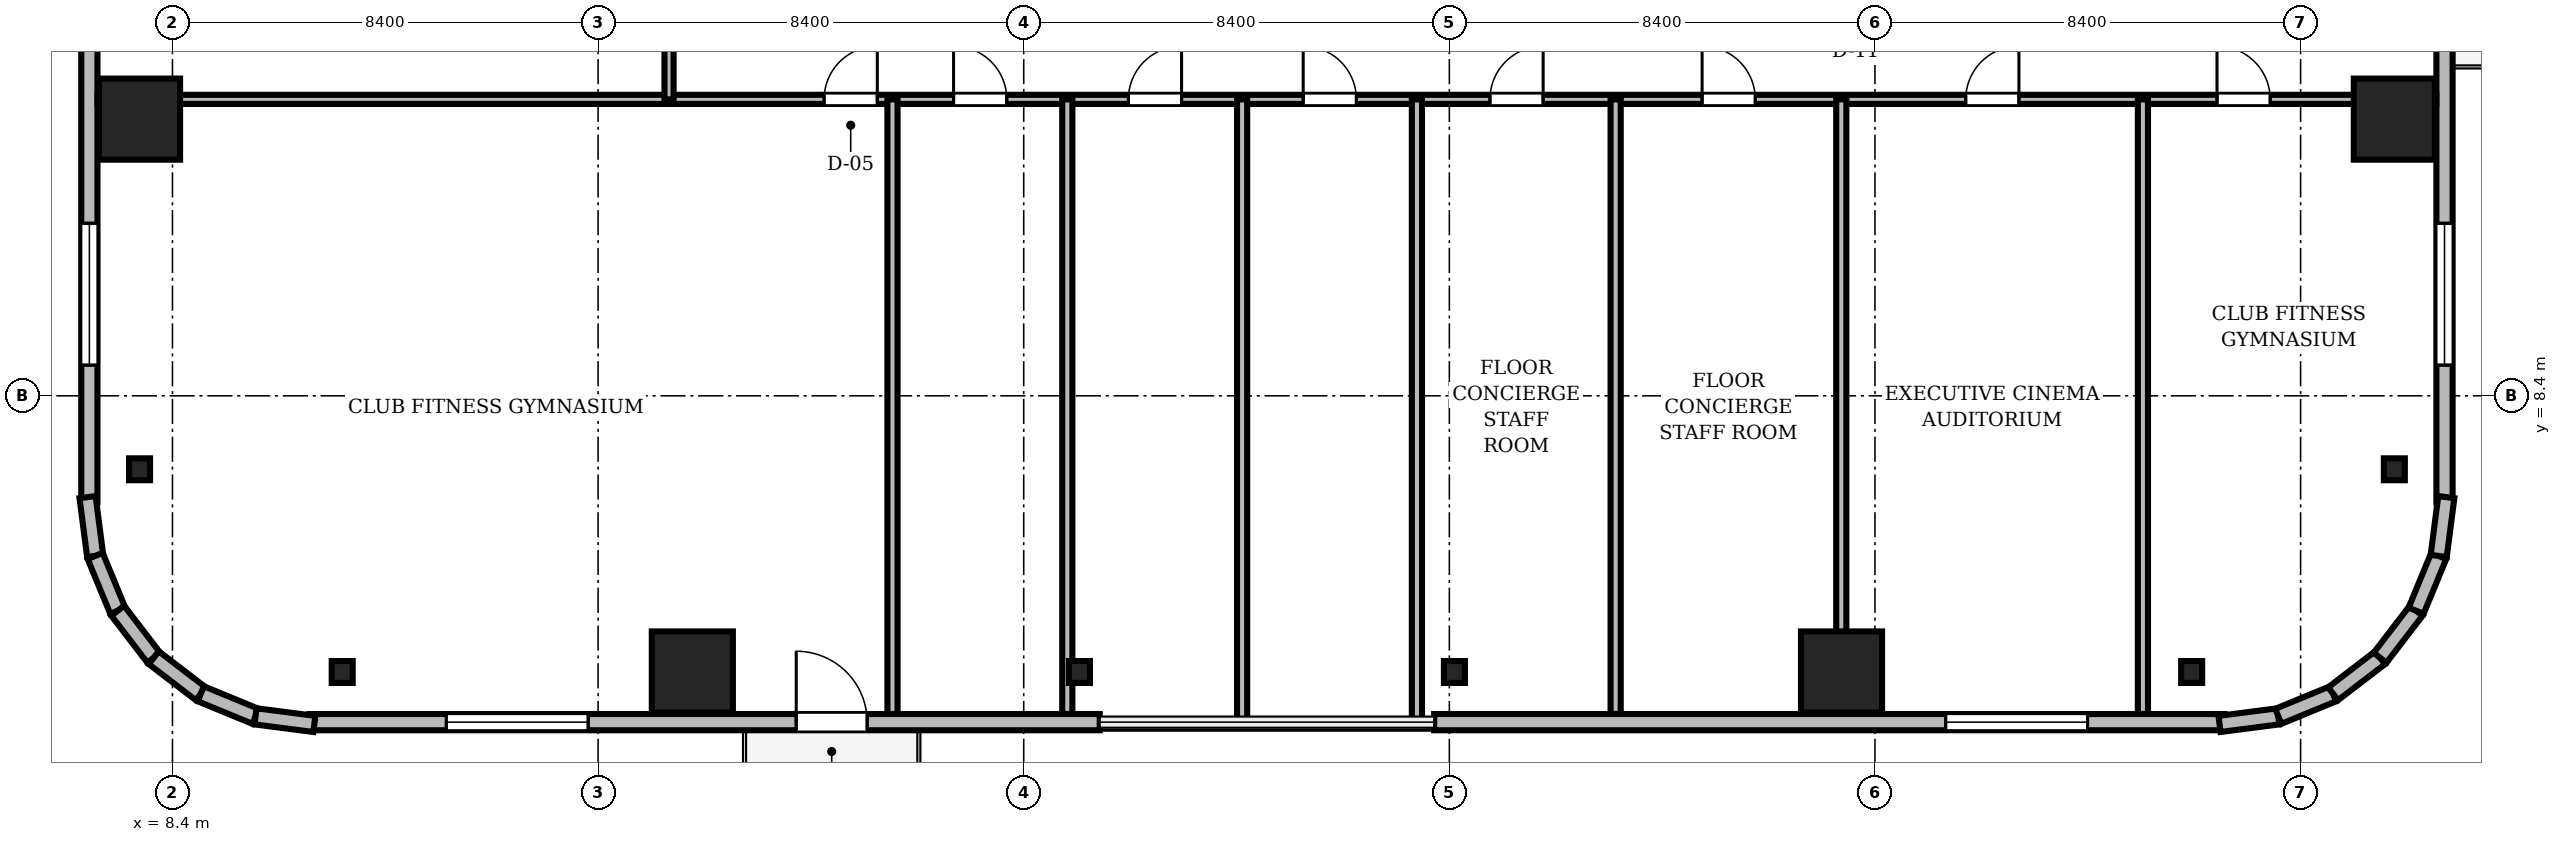
"""IFC4 building model, lengths in metres.
Left out: names, types, materials, properties, quantities, classifications, styles, units other than length and angle.
Written with IfcOpenShell. Run it as: python <this file> out.ifc"""

import sys

from ifc_helpers import new_model, si_unit, direction, frame, frame_2d, origin, origin_2d, place, context, subcontext, project, spatial, rectangle, i_section, extrude, source, transform, mapped, element, fill, save


model = new_model("IFC4")
c1 = context("Model", 3, precision=1e-05, world=origin(), true_north=direction((0.0, 1.0)))
c2 = subcontext(c1, "Body", "Model", "MODEL_VIEW")
j1 = project(units=[si_unit("LENGTHUNIT", "METRE"), si_unit("PLANEANGLEUNIT", "RADIAN")], contexts=[c1])
p1 = place(None, origin())
s1 = spatial("IfcSite", under=j1, at=p1, CompositionType="ELEMENT")
p2 = place(p1, origin())
s2 = spatial("IfcBuilding", under=s1, at=p2, CompositionType="ELEMENT")
p3 = place(p2, frame((0.0, 0.0, 133.5)))
s3 = spatial("IfcBuildingStorey", under=s2, at=p3, CompositionType="ELEMENT", Elevation=133.5)
m1 = source(origin(), c2, "Body", "SweptSolid", [
    extrude(rectangle(XDim=1.6, YDim=1.6, at=origin_2d()), origin(), (0.0, 0.0, 1.0), 3.46),
])
for number, where, z_axis, x_axis in (
    (1, (18.66, 2.95, 0.0), (0.0, 0.0, 1.0), (1.0, 0.0, 0.0)),
    (2, (41.34, 2.95, 0.0), (0.0, 0.0, 1.0), (1.0, 0.0, 0.0)),
    (3, (52.25, 13.86, 0.0), (0.0, 0.0, 1.0), (1.0, 0.0, 0.0)),
    (4, (7.75, 13.86, 0.0), (0.0, 0.0, 1.0), (1.0, 0.0, 0.0)),
):
    element("IfcColumn", number, at=place(p3, frame(where, z_axis=z_axis, x_axis=x_axis)), inside=s3, PredefinedType="COLUMN", context=c2, shape_type="MappedRepresentation", body=[
        mapped(m1, transform((0.0, 0.0, 0.0), scale=1.0)),
    ])
m2 = source(origin(), c2, "Body", "SweptSolid", [
    extrude(i_section(OverallWidth=0.414, OverallDepth=0.432, WebThickness=0.026, FlangeThickness=0.04, FilletRadius=0.015, at=origin_2d()), origin(), (0.0, 0.0, 1.0), 3.46),
])
for number, where, z_axis, x_axis in (
    (5, (11.75, 2.95, 0.0), (0.0, 0.0, 1.0), (1.0, 0.0, 0.0)),
    (6, (26.3, 2.95, 0.0), (0.0, 0.0, 1.0), (1.0, 0.0, 0.0)),
    (7, (33.7, 2.95, 0.0), (0.0, 0.0, 1.0), (1.0, 0.0, 0.0)),
    (8, (48.25, 2.95, 0.0), (0.0, 0.0, 1.0), (1.0, 0.0, 0.0)),
    (9, (52.25, 6.95, 0.0), (0.0, 0.0, 1.0), (1.0, 0.0, 0.0)),
    (10, (7.75, 6.95, 0.0), (0.0, 0.0, 1.0), (1.0, 0.0, 0.0)),
):
    element("IfcColumn", number, at=place(p3, frame(where, z_axis=z_axis, x_axis=x_axis)), inside=s3, PredefinedType="COLUMN", context=c2, shape_type="MappedRepresentation", body=[
        mapped(m2, transform((0.0, 0.0, 0.0), scale=1.0)),
    ])
m3 = source(origin(), c2, "Body", "SweptSolid", [
    extrude(rectangle(XDim=15.6, YDim=0.32, at=frame_2d((7.8, 0.0))), origin(), (0.0, 0.0, 1.0), 3.46),
])
p4 = place(p3, frame((11.1, 1.96, 0.0), z_axis=(0.0, 0.0, 1.0), x_axis=(1.0, 0.0, 0.0)))
e11 = element("IfcWall", 11, at=p4, inside=s3, PredefinedType="SOLIDWALL", context=c2, shape_type="MappedRepresentation", body=[
    mapped(m3, transform((0.0, 0.0, 0.0), scale=1.0)),
])
m4 = source(origin(), c2, "Body", "SweptSolid", [
    extrude(rectangle(XDim=1.4, YDim=2.3, at=frame_2d((0.7, 1.15))), frame((0.0, 0.17, 0.0), z_axis=(0.0, -1.0, 0.0), x_axis=(1.0, 0.0, 0.0)), (0.0, 0.0, 1.0), 0.34),
])
p5 = place(p4, frame((9.61, 0.0, 0.0)))
e12 = element("IfcOpeningElement", 12, at=p5, cuts=e11, PredefinedType="OPENING", context=c2, shape_type="MappedRepresentation", body=[
    mapped(m4, transform((0.0, 0.0, 0.0), scale=1.0)),
])
m5 = source(origin(), c2, "Body", "SweptSolid", [
    extrude(rectangle(XDim=2.8, YDim=2.4, at=frame_2d((1.4, 1.2))), frame((0.0, 0.17, 0.0), z_axis=(0.0, -1.0, 0.0), x_axis=(1.0, 0.0, 0.0)), (0.0, 0.0, 1.0), 0.34),
])
p6 = place(p4, frame((2.705, 0.0, 0.72)))
e13 = element("IfcOpeningElement", 13, at=p6, cuts=e11, PredefinedType="OPENING", context=c2, shape_type="MappedRepresentation", body=[
    mapped(m5, transform((0.0, 0.0, 0.0), scale=1.0)),
])
p7 = place(p3, frame((33.3, 1.96, 0.0), z_axis=(0.0, 0.0, 1.0), x_axis=(1.0, 0.0, 0.0)))
e14 = element("IfcWall", 14, at=p7, inside=s3, PredefinedType="SOLIDWALL", context=c2, shape_type="MappedRepresentation", body=[
    mapped(m3, transform((0.0, 0.0, 0.0), scale=1.0)),
])
p8 = place(p7, frame((10.095, 0.0, 0.72)))
e15 = element("IfcOpeningElement", 15, at=p8, cuts=e14, PredefinedType="OPENING", context=c2, shape_type="MappedRepresentation", body=[
    mapped(m5, transform((0.0, 0.0, 0.0), scale=1.0)),
])
p9 = place(p3, frame((6.76, 21.9, 0.0), z_axis=(0.0, 0.0, 1.0), x_axis=(0.0, -1.0, 0.0)))
e16 = element("IfcWall", 16, at=p9, inside=s3, PredefinedType="SOLIDWALL", context=c2, shape_type="MappedRepresentation", body=[
    mapped(m3, transform((0.0, 0.0, 0.0), scale=1.0)),
])
p10 = place(p9, frame((10.095, 0.0, 0.72)))
e17 = element("IfcOpeningElement", 17, at=p10, cuts=e16, PredefinedType="OPENING", context=c2, shape_type="MappedRepresentation", body=[
    mapped(m5, transform((0.0, 0.0, 0.0), scale=1.0)),
])
p11 = place(p3, frame((53.24, 6.3, 0.0), z_axis=(0.0, 0.0, 1.0), x_axis=(0.0, 1.0, 0.0)))
e18 = element("IfcWall", 18, at=p11, inside=s3, PredefinedType="SOLIDWALL", context=c2, shape_type="MappedRepresentation", body=[
    mapped(m3, transform((0.0, 0.0, 0.0), scale=1.0)),
])
p12 = place(p11, frame((9.61, 0.0, 0.0)))
e19 = element("IfcOpeningElement", 19, at=p12, cuts=e18, PredefinedType="OPENING", context=c2, shape_type="MappedRepresentation", body=[
    mapped(m4, transform((0.0, 0.0, 0.0), scale=1.0)),
])
p13 = place(p11, frame((2.705, 0.0, 0.72)))
e20 = element("IfcOpeningElement", 20, at=p13, cuts=e18, PredefinedType="OPENING", context=c2, shape_type="MappedRepresentation", body=[
    mapped(m5, transform((0.0, 0.0, 0.0), scale=1.0)),
])
m6 = source(origin(), c2, "Body", "SweptSolid", [
    extrude(rectangle(XDim=1.171, YDim=0.32, at=frame_2d((0.585, 0.0))), origin(), (0.0, 0.0, 1.0), 3.46),
])
p14 = place(p3, frame((6.724, 6.401, 0.0), z_axis=(0.0, 0.0, 1.0), x_axis=(0.128269133229, -0.991739395941, 0.0)))
e21 = element("IfcWall", 21, at=p14, inside=s3, PredefinedType="SOLIDWALL", context=c2, shape_type="MappedRepresentation", body=[
    mapped(m6, transform((0.0, 0.0, 0.0), scale=1.0)),
])
m7 = source(origin(), c2, "Body", "SweptSolid", [
    extrude(rectangle(XDim=1.169, YDim=0.32, at=frame_2d((0.584, 0.0))), origin(), (0.0, 0.0, 1.0), 3.46),
])
for number, where, z_axis, x_axis in (
    (22, (6.875, 5.24, 0.0), (0.0, 0.0, 1.0), (0.381, -0.925, 0.0)),
    (23, (7.32, 4.159, 0.0), (0.0, 0.0, 1.0), (0.608, -0.794, 0.0)),
):
    element("IfcWall", number, at=place(p3, frame(where, z_axis=z_axis, x_axis=x_axis)), inside=s3, PredefinedType="SOLIDWALL", context=c2, shape_type="MappedRepresentation", body=[
        mapped(m7, transform((0.0, 0.0, 0.0), scale=1.0)),
    ])
m8 = source(origin(), c2, "Body", "SweptSolid", [
    extrude(rectangle(XDim=1.169, YDim=0.32, at=frame_2d((0.584, 0.0))), origin(), (0.0, 0.0, 1.0), 3.46),
])
p15 = place(p3, frame((8.031, 3.231, 0.0), z_axis=(0.0, 0.0, 1.0), x_axis=(0.793663520347, -0.608356981114, 0.0)))
e24 = element("IfcWall", 24, at=p15, inside=s3, PredefinedType="SOLIDWALL", context=c2, shape_type="MappedRepresentation", body=[
    mapped(m8, transform((0.0, 0.0, 0.0), scale=1.0)),
])
m9 = source(origin(), c2, "Body", "SweptSolid", [
    extrude(rectangle(XDim=1.169, YDim=0.32, at=frame_2d((0.585, 0.0))), origin(), (0.0, 0.0, 1.0), 3.46),
])
p16 = place(p3, frame((8.959, 2.52, 0.0), z_axis=(0.0, 0.0, 1.0), x_axis=(0.924479075121, -0.381232789334, 0.0)))
e25 = element("IfcWall", 25, at=p16, inside=s3, PredefinedType="SOLIDWALL", context=c2, shape_type="MappedRepresentation", body=[
    mapped(m9, transform((0.0, 0.0, 0.0), scale=1.0)),
])
m10 = source(origin(), c2, "Body", "SweptSolid", [
    extrude(rectangle(XDim=1.17, YDim=0.32, at=frame_2d((0.585, 0.0))), origin(), (0.0, 0.0, 1.0), 3.46),
])
for number, where, z_axis, x_axis in (
    (26, (10.04, 2.074, 0.0), (0.0, 0.0, 1.0), (0.992, -0.128, 0.0)),
    (27, (48.8, 1.925, 0.0), (0.0, 0.0, 1.0), (0.992, 0.128, 0.0)),
):
    element("IfcWall", number, at=place(p3, frame(where, z_axis=z_axis, x_axis=x_axis)), inside=s3, PredefinedType="SOLIDWALL", context=c2, shape_type="MappedRepresentation", body=[
        mapped(m10, transform((0.0, 0.0, 0.0), scale=1.0)),
    ])
p17 = place(p3, frame((49.96, 2.074, 0.0), z_axis=(0.0, 0.0, 1.0), x_axis=(0.924479075121, 0.381232789334, 0.0)))
e28 = element("IfcWall", 28, at=p17, inside=s3, PredefinedType="SOLIDWALL", context=c2, shape_type="MappedRepresentation", body=[
    mapped(m9, transform((0.0, 0.0, 0.0), scale=1.0)),
])
p18 = place(p3, frame((51.041, 2.52, 0.0), z_axis=(0.0, 0.0, 1.0), x_axis=(0.793663520347, 0.608356981114, 0.0)))
e29 = element("IfcWall", 29, at=p18, inside=s3, PredefinedType="SOLIDWALL", context=c2, shape_type="MappedRepresentation", body=[
    mapped(m8, transform((0.0, 0.0, 0.0), scale=1.0)),
])
for number, where, z_axis, x_axis in (
    (30, (51.969, 3.231, 0.0), (0.0, 0.0, 1.0), (0.608, 0.794, 0.0)),
    (31, (52.68, 4.159, 0.0), (0.0, 0.0, 1.0), (0.381, 0.925, 0.0)),
):
    element("IfcWall", number, at=place(p3, frame(where, z_axis=z_axis, x_axis=x_axis)), inside=s3, PredefinedType="SOLIDWALL", context=c2, shape_type="MappedRepresentation", body=[
        mapped(m7, transform((0.0, 0.0, 0.0), scale=1.0)),
    ])
p19 = place(p3, frame((53.125, 5.24, 0.0), z_axis=(0.0, 0.0, 1.0), x_axis=(0.128269133229, 0.991739395941, 0.0)))
e32 = element("IfcWall", 32, at=p19, inside=s3, PredefinedType="SOLIDWALL", context=c2, shape_type="MappedRepresentation", body=[
    mapped(m6, transform((0.0, 0.0, 0.0), scale=1.0)),
])
m11 = source(origin(), c2, "Body", "SweptSolid", [
    extrude(rectangle(XDim=46.156, YDim=0.18, at=frame_2d((23.078, 0.0))), origin(), (0.0, 0.0, 1.0), 2.702),
])
p20 = place(p3, frame((6.922, 14.25, 0.0), z_axis=(0.0, 0.0, 1.0), x_axis=(1.0, 0.0, 0.0)))
e33 = element("IfcWall", 33, at=p20, inside=s3, PredefinedType="PARTITIONING", context=c2, shape_type="MappedRepresentation", body=[
    mapped(m11, transform((0.0, 0.0, 0.0), scale=1.0)),
])
m12 = source(origin(), c2, "Body", "SweptSolid", [
    extrude(rectangle(XDim=1.05, YDim=2.2, at=frame_2d((0.525, 1.1))), frame((0.0, 0.1, 0.0), z_axis=(0.0, -1.0, 0.0), x_axis=(1.0, 0.0, 0.0)), (0.0, 0.0, 1.0), 0.2),
])
p21 = place(p20, frame((14.338, 0.0, 0.0)))
e34 = element("IfcOpeningElement", 34, at=p21, cuts=e33, PredefinedType="OPENING", context=c2, shape_type="MappedRepresentation", body=[
    mapped(m12, transform((0.0, 0.0, 0.0), scale=1.0)),
])
p22 = place(p20, frame((16.893, 0.0, 0.0)))
e35 = element("IfcOpeningElement", 35, at=p22, cuts=e33, PredefinedType="OPENING", context=c2, shape_type="MappedRepresentation", body=[
    mapped(m12, transform((0.0, 0.0, 0.0), scale=1.0)),
])
p23 = place(p20, frame((20.344, 0.0, 0.0)))
e36 = element("IfcOpeningElement", 36, at=p23, cuts=e33, PredefinedType="OPENING", context=c2, shape_type="MappedRepresentation", body=[
    mapped(m12, transform((0.0, 0.0, 0.0), scale=1.0)),
])
p24 = place(p20, frame((23.793, 0.0, 0.0)))
e37 = element("IfcOpeningElement", 37, at=p24, cuts=e33, PredefinedType="OPENING", context=c2, shape_type="MappedRepresentation", body=[
    mapped(m12, transform((0.0, 0.0, 0.0), scale=1.0)),
])
p25 = place(p20, frame((27.479, 0.0, 0.0)))
e38 = element("IfcOpeningElement", 38, at=p25, cuts=e33, PredefinedType="OPENING", context=c2, shape_type="MappedRepresentation", body=[
    mapped(m12, transform((0.0, 0.0, 0.0), scale=1.0)),
])
p26 = place(p20, frame((31.666, 0.0, 0.0)))
e39 = element("IfcOpeningElement", 39, at=p26, cuts=e33, PredefinedType="OPENING", context=c2, shape_type="MappedRepresentation", body=[
    mapped(m12, transform((0.0, 0.0, 0.0), scale=1.0)),
])
p27 = place(p20, frame((36.869, 0.0, 0.0)))
e40 = element("IfcOpeningElement", 40, at=p27, cuts=e33, PredefinedType="OPENING", context=c2, shape_type="MappedRepresentation", body=[
    mapped(m12, transform((0.0, 0.0, 0.0), scale=1.0)),
])
p28 = place(p20, frame((41.828, 0.0, 0.0)))
e41 = element("IfcOpeningElement", 41, at=p28, cuts=e33, PredefinedType="OPENING", context=c2, shape_type="MappedRepresentation", body=[
    mapped(m12, transform((0.0, 0.0, 0.0), scale=1.0)),
])
m13 = source(origin(), c2, "Body", "SweptSolid", [
    extrude(rectangle(XDim=14.3, YDim=0.18, at=frame_2d((7.15, 0.0))), origin(), (0.0, 0.0, 1.0), 2.852),
])
p29 = place(p3, frame((18.2, 14.25, 0.0), z_axis=(0.0, 0.0, 1.0), x_axis=(0.0, 1.0, 0.0)))
e42 = element("IfcWall", 42, at=p29, inside=s3, PredefinedType="PARTITIONING", context=c2, shape_type="MappedRepresentation", body=[
    mapped(m13, transform((0.0, 0.0, 0.0), scale=1.0)),
])
p30 = place(p29, frame((1.838, 0.0, 0.0)))
e43 = element("IfcOpeningElement", 43, at=p30, cuts=e42, PredefinedType="OPENING", context=c2, shape_type="MappedRepresentation", body=[
    mapped(m12, transform((0.0, 0.0, 0.0), scale=1.0)),
])
m14 = source(origin(), c2, "Body", "SweptSolid", [
    extrude(rectangle(XDim=0.95, YDim=2.15, at=frame_2d((0.475, 1.075))), frame((0.0, 0.1, 0.0), z_axis=(0.0, -1.0, 0.0), x_axis=(1.0, 0.0, 0.0)), (0.0, 0.0, 1.0), 0.2),
])
p31 = place(p29, frame((7.78, 0.0, 0.0)))
e44 = element("IfcOpeningElement", 44, at=p31, cuts=e42, PredefinedType="OPENING", context=c2, shape_type="MappedRepresentation", body=[
    mapped(m14, transform((0.0, 0.0, 0.0), scale=1.0)),
])
p32 = place(p29, frame((12.497, 0.0, 0.0)))
e45 = element("IfcOpeningElement", 45, at=p32, cuts=e42, PredefinedType="OPENING", context=c2, shape_type="MappedRepresentation", body=[
    mapped(m14, transform((0.0, 0.0, 0.0), scale=1.0)),
])
m15 = source(origin(), c2, "Body", "SweptSolid", [
    extrude(rectangle(XDim=12.128, YDim=0.2, at=frame_2d((6.064, 0.0))), origin(), (0.0, 0.0, 1.0), 2.702),
])
for number, where, z_axis, x_axis in (
    (46, (22.61, 2.122, 0.0), (0.0, 0.0, 1.0), (0.0, 1.0, 0.0)),
    (47, (26.06, 2.122, 0.0), (0.0, 0.0, 1.0), (0.0, 1.0, 0.0)),
):
    element("IfcWall", number, at=place(p3, frame(where, z_axis=z_axis, x_axis=x_axis)), inside=s3, PredefinedType="PARTITIONING", context=c2, shape_type="MappedRepresentation", body=[
        mapped(m15, transform((0.0, 0.0, 0.0), scale=1.0)),
    ])
m16 = source(origin(), c2, "Body", "SweptSolid", [
    extrude(rectangle(XDim=12.32, YDim=0.2, at=frame_2d((6.16, 0.0))), origin(), (0.0, 0.0, 1.0), 2.702),
])
for number, where, z_axis, x_axis in (
    (48, (29.51, 1.93, 0.0), (0.0, 0.0, 1.0), (0.0, 1.0, 0.0)),
    (49, (32.96, 1.93, 0.0), (0.0, 0.0, 1.0), (0.0, 1.0, 0.0)),
):
    element("IfcWall", number, at=place(p3, frame(where, z_axis=z_axis, x_axis=x_axis)), inside=s3, PredefinedType="PARTITIONING", context=c2, shape_type="MappedRepresentation", body=[
        mapped(m16, transform((0.0, 0.0, 0.0), scale=1.0)),
    ])
for number, where, z_axis, x_axis in (
    (50, (36.882, 2.122, 0.0), (0.0, 0.0, 1.0), (0.0, 1.0, 0.0)),
    (51, (41.335, 2.122, 0.0), (0.0, 0.0, 1.0), (0.0, 1.0, 0.0)),
    (52, (47.288, 2.122, 0.0), (0.0, 0.0, 1.0), (0.0, 1.0, 0.0)),
):
    element("IfcWall", number, at=place(p3, frame(where, z_axis=z_axis, x_axis=x_axis)), inside=s3, PredefinedType="PARTITIONING", context=c2, shape_type="MappedRepresentation", body=[
        mapped(m15, transform((0.0, 0.0, 0.0), scale=1.0)),
    ])
m17 = source(origin(), c2, "Body", "SweptSolid", [
    extrude(rectangle(XDim=1.4, YDim=2.3, at=frame_2d((0.7, 1.15))), frame((0.0, 0.025, 0.0), z_axis=(0.0, -1.0, 0.0), x_axis=(1.0, 0.0, 0.0)), (0.0, 0.0, 1.0), 0.05),
])
p33 = place(p5, frame((1.4, 0.0, 0.0), z_axis=(0.0, 0.0, 1.0), x_axis=(-1.0, 0.0, 0.0)))
e53 = element("IfcDoor", 53, at=p33, inside=s3, OperationType="DOUBLE_DOOR_SLIDING", PredefinedType="DOOR", context=c2, shape_type="MappedRepresentation", body=[
    mapped(m17, transform((0.0, 0.0, 0.0), scale=1.0)),
])
fill(e12, e53)
m18 = source(origin(), c2, "Body", "SweptSolid", [
    extrude(rectangle(XDim=2.8, YDim=2.4, at=frame_2d((1.4, 1.2))), frame((0.0, 0.03, 0.0), z_axis=(0.0, -1.0, 0.0), x_axis=(1.0, 0.0, 0.0)), (0.0, 0.0, 1.0), 0.06),
])
p34 = place(p6, origin())
e54 = element("IfcWindow", 54, at=p34, inside=s3, PartitioningType="SINGLE_PANEL", PredefinedType="WINDOW", context=c2, shape_type="MappedRepresentation", body=[
    mapped(m18, transform((0.0, 0.0, 0.0), scale=1.0)),
])
fill(e13, e54)
p35 = place(p8, origin())
e55 = element("IfcWindow", 55, at=p35, inside=s3, PartitioningType="SINGLE_PANEL", PredefinedType="WINDOW", context=c2, shape_type="MappedRepresentation", body=[
    mapped(m18, transform((0.0, 0.0, 0.0), scale=1.0)),
])
fill(e15, e55)
p36 = place(p10, origin())
e56 = element("IfcWindow", 56, at=p36, inside=s3, PartitioningType="SINGLE_PANEL", PredefinedType="WINDOW", context=c2, shape_type="MappedRepresentation", body=[
    mapped(m18, transform((0.0, 0.0, 0.0), scale=1.0)),
])
fill(e17, e56)
p37 = place(p13, origin())
e57 = element("IfcWindow", 57, at=p37, inside=s3, PartitioningType="SINGLE_PANEL", PredefinedType="WINDOW", context=c2, shape_type="MappedRepresentation", body=[
    mapped(m18, transform((0.0, 0.0, 0.0), scale=1.0)),
])
fill(e20, e57)
m19 = source(origin(), c2, "Body", "SweptSolid", [
    extrude(rectangle(XDim=1.05, YDim=2.2, at=frame_2d((0.525, 1.1))), frame((0.0, 0.025, 0.0), z_axis=(0.0, -1.0, 0.0), x_axis=(1.0, 0.0, 0.0)), (0.0, 0.0, 1.0), 0.05),
])
p38 = place(p21, origin())
e58 = element("IfcDoor", 58, at=p38, inside=s3, OperationType="SINGLE_SWING_RIGHT", PredefinedType="DOOR", context=c2, shape_type="MappedRepresentation", body=[
    mapped(m19, transform((0.0, 0.0, 0.0), scale=1.0)),
])
fill(e34, e58)
p39 = place(p22, origin())
e59 = element("IfcDoor", 59, at=p39, inside=s3, OperationType="SINGLE_SWING_LEFT", PredefinedType="DOOR", context=c2, shape_type="MappedRepresentation", body=[
    mapped(m19, transform((0.0, 0.0, 0.0), scale=1.0)),
])
fill(e35, e59)
p40 = place(p23, origin())
e60 = element("IfcDoor", 60, at=p40, inside=s3, OperationType="SINGLE_SWING_RIGHT", PredefinedType="DOOR", context=c2, shape_type="MappedRepresentation", body=[
    mapped(m19, transform((0.0, 0.0, 0.0), scale=1.0)),
])
fill(e36, e60)
p41 = place(p24, origin())
e61 = element("IfcDoor", 61, at=p41, inside=s3, OperationType="SINGLE_SWING_LEFT", PredefinedType="DOOR", context=c2, shape_type="MappedRepresentation", body=[
    mapped(m19, transform((0.0, 0.0, 0.0), scale=1.0)),
])
fill(e37, e61)
p42 = place(p25, origin())
e62 = element("IfcDoor", 62, at=p42, inside=s3, OperationType="SINGLE_SWING_RIGHT", PredefinedType="DOOR", context=c2, shape_type="MappedRepresentation", body=[
    mapped(m19, transform((0.0, 0.0, 0.0), scale=1.0)),
])
fill(e38, e62)
p43 = place(p26, origin())
e63 = element("IfcDoor", 63, at=p43, inside=s3, OperationType="SINGLE_SWING_LEFT", PredefinedType="DOOR", context=c2, shape_type="MappedRepresentation", body=[
    mapped(m19, transform((0.0, 0.0, 0.0), scale=1.0)),
])
fill(e39, e63)
p44 = place(p27, origin())
e64 = element("IfcDoor", 64, at=p44, inside=s3, OperationType="SINGLE_SWING_RIGHT", PredefinedType="DOOR", context=c2, shape_type="MappedRepresentation", body=[
    mapped(m19, transform((0.0, 0.0, 0.0), scale=1.0)),
])
fill(e40, e64)
p45 = place(p28, origin())
e65 = element("IfcDoor", 65, at=p45, inside=s3, OperationType="SINGLE_SWING_LEFT", PredefinedType="DOOR", context=c2, shape_type="MappedRepresentation", body=[
    mapped(m19, transform((0.0, 0.0, 0.0), scale=1.0)),
])
fill(e41, e65)
save(model, sys.argv[1])
